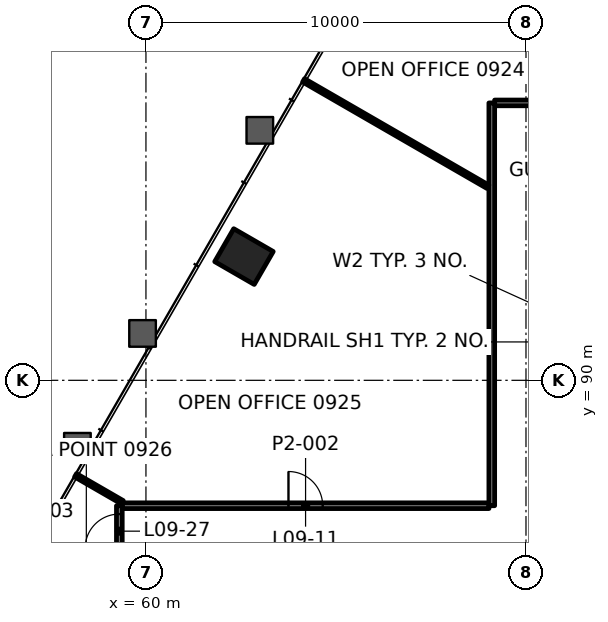
"""IFC4 building model, lengths in metres.
Left out: names, types, materials, properties, quantities, classifications, styles, units other than length and angle.
Written with IfcOpenShell. Run it as: python <this file> out.ifc"""

import sys

from ifc_helpers import new_model, si_unit, direction, frame, frame_2d, origin, origin_2d, place, context, subcontext, project, spatial, rectangle, extrude, element, fill, save


model = new_model("IFC4")
c1 = context("Model", 3, precision=1e-05, world=origin(), true_north=direction((0.0, 1.0)))
c2 = subcontext(c1, "Body", "Model", "MODEL_VIEW")
j1 = project(units=[si_unit("LENGTHUNIT", "METRE"), si_unit("PLANEANGLEUNIT", "RADIAN")], contexts=[c1])
p1 = place(None, origin())
s1 = spatial("IfcSite", under=j1, at=p1, CompositionType="ELEMENT")
p2 = place(p1, origin())
s2 = spatial("IfcBuilding", under=s1, at=p2, CompositionType="ELEMENT")
p3 = place(p2, frame((0.0, 0.0, 44.2)))
s3 = spatial("IfcBuildingStorey", under=s2, at=p3, CompositionType="ELEMENT", Elevation=44.2)
p4 = place(p3, frame((62.579, 93.256, -0.0), z_axis=(0.0, 0.0, 1.0), x_axis=(-0.5, -0.866025403784, 0.0)))
e1 = element("IfcColumn", 1, at=p4, inside=s3, PredefinedType="COLUMN", context=c2, shape_type="SweptSolid", body=[
    extrude(rectangle(XDim=1.0, YDim=1.2, at=origin_2d()), origin(), (0.0, 0.0, 1.0), 4.2),
])
p5 = place(p3, frame((59.375, 86.7, 0.0), z_axis=(0.0, 0.0, 1.0), x_axis=(1.0, 0.0, 0.0)))
e2 = element("IfcWall", 2, at=p5, inside=s3, PredefinedType="PARTITIONING", context=c2, shape_type="SweptSolid", body=[
    extrude(rectangle(XDim=9.649, YDim=0.15, at=frame_2d((4.825, 0.0))), origin(), (0.0, 0.0, 1.0), 3.4),
])
p6 = place(p5, frame((4.375, 0.0, 0.0)))
e3 = element("IfcOpeningElement", 3, at=p6, cuts=e2, PredefinedType="OPENING", context=c2, shape_type="SweptSolid", body=[
    extrude(rectangle(XDim=0.9, YDim=2.1, at=frame_2d((0.45, 1.05))), frame((0.0, 0.085, 0.0), z_axis=(0.0, -1.0, 0.0), x_axis=(1.0, 0.0, 0.0)), (0.0, 0.0, 1.0), 0.17),
])
p7 = place(p3, frame((69.176, 97.3, 0.0), z_axis=(0.0, 0.0, 1.0), x_axis=(1.0, 0.0, 0.0)))
e4 = element("IfcWall", 4, at=p7, inside=s3, PredefinedType="PARTITIONING", context=c2, shape_type="SweptSolid", body=[
    extrude(rectangle(XDim=4.849, YDim=0.15, at=frame_2d((2.425, 0.0))), origin(), (0.0, 0.0, 1.0), 3.4),
])
p8 = place(p7, frame((1.975, 0.0, 0.0)))
e5 = element("IfcOpeningElement", 5, at=p8, cuts=e4, PredefinedType="OPENING", context=c2, shape_type="SweptSolid", body=[
    extrude(rectangle(XDim=0.9, YDim=2.1, at=frame_2d((0.45, 1.05))), frame((0.0, 0.085, 0.0), z_axis=(0.0, -1.0, 0.0), x_axis=(1.0, 0.0, 0.0)), (0.0, 0.0, 1.0), 0.17),
])
p9 = place(p3, frame((69.1, 86.7, 0.0), z_axis=(0.0, 0.0, 1.0), x_axis=(0.0, 1.0, 0.0)))
e6 = element("IfcWall", 6, at=p9, inside=s3, PredefinedType="PARTITIONING", context=c2, shape_type="SweptSolid", body=[
    extrude(rectangle(XDim=10.6, YDim=0.15, at=frame_2d((5.3, 0.0))), origin(), (0.0, 0.0, 1.0), 3.4),
])
p10 = place(p3, frame((59.3, 66.975, 0.0), z_axis=(0.0, 0.0, 1.0), x_axis=(0.0, 1.0, 0.0)))
e7 = element("IfcWall", 7, at=p10, inside=s3, PredefinedType="PARTITIONING", context=c2, shape_type="SweptSolid", body=[
    extrude(rectangle(XDim=19.725, YDim=0.15, at=frame_2d((9.862, 0.0))), origin(), (0.0, 0.0, 1.0), 3.4),
])
p11 = place(p10, frame((12.483, 0.0, 0.0)))
e8 = element("IfcOpeningElement", 8, at=p11, cuts=e7, PredefinedType="OPENING", context=c2, shape_type="SweptSolid", body=[
    extrude(rectangle(XDim=0.9, YDim=2.1, at=frame_2d((0.45, 1.05))), frame((0.0, 0.085, 0.0), z_axis=(0.0, -1.0, 0.0), x_axis=(1.0, 0.0, 0.0)), (0.0, 0.0, 1.0), 0.17),
])
p12 = place(p10, frame((15.254, 0.0, 0.0)))
e9 = element("IfcOpeningElement", 9, at=p12, cuts=e7, PredefinedType="OPENING", context=c2, shape_type="SweptSolid", body=[
    extrude(rectangle(XDim=0.9, YDim=2.1, at=frame_2d((0.45, 1.05))), frame((0.0, 0.085, 0.0), z_axis=(0.0, -1.0, 0.0), x_axis=(1.0, 0.0, 0.0)), (0.0, 0.0, 1.0), 0.17),
])
p13 = place(p10, frame((18.606, 0.0, 0.0)))
e10 = element("IfcOpeningElement", 10, at=p13, cuts=e7, PredefinedType="OPENING", context=c2, shape_type="SweptSolid", body=[
    extrude(rectangle(XDim=0.9, YDim=2.1, at=frame_2d((0.45, 1.05))), frame((0.0, 0.085, 0.0), z_axis=(0.0, -1.0, 0.0), x_axis=(1.0, 0.0, 0.0)), (0.0, 0.0, 1.0), 0.17),
])
p14 = place(p3, frame((68.999, 95.093, 0.0), z_axis=(0.0, 0.0, 1.0), x_axis=(-0.866032434152, 0.499987822848, 0.0)))
e11 = element("IfcWall", 11, at=p14, inside=s3, PredefinedType="PARTITIONING", context=c2, shape_type="SweptSolid", body=[
    extrude(rectangle(XDim=5.601, YDim=0.1, at=frame_2d((2.801, 0.0))), origin(), (0.0, 0.0, 1.0), 3.165),
])
p15 = place(p3, frame((59.379, 86.79, 0.0), z_axis=(0.0, 0.0, 1.0), x_axis=(-0.866025408043, 0.499999992624, 0.0)))
e12 = element("IfcWall", 12, at=p15, inside=s3, PredefinedType="PARTITIONING", context=c2, shape_type="SweptSolid", body=[
    extrude(rectangle(XDim=1.421, YDim=0.1, at=frame_2d((0.711, 0.0))), origin(), (0.0, 0.0, 1.0), 3.165),
])
p16 = place(p6, origin())
e13 = element("IfcDoor", 13, at=p16, inside=s3, OperationType="SINGLE_SWING_RIGHT", PredefinedType="DOOR", context=c2, shape_type="SweptSolid", body=[
    extrude(rectangle(XDim=0.9, YDim=2.1, at=frame_2d((0.45, 1.05))), frame((0.0, 0.025, 0.0), z_axis=(0.0, -1.0, 0.0), x_axis=(1.0, 0.0, 0.0)), (0.0, 0.0, 1.0), 0.05),
])
fill(e3, e13)
p17 = place(p13, origin())
e14 = element("IfcDoor", 14, at=p17, inside=s3, OperationType="SINGLE_SWING_LEFT", PredefinedType="DOOR", context=c2, shape_type="SweptSolid", body=[
    extrude(rectangle(XDim=0.9, YDim=2.1, at=frame_2d((0.45, 1.05))), frame((0.0, 0.025, 0.0), z_axis=(0.0, -1.0, 0.0), x_axis=(1.0, 0.0, 0.0)), (0.0, 0.0, 1.0), 0.05),
])
fill(e10, e14)
save(model, sys.argv[1])
